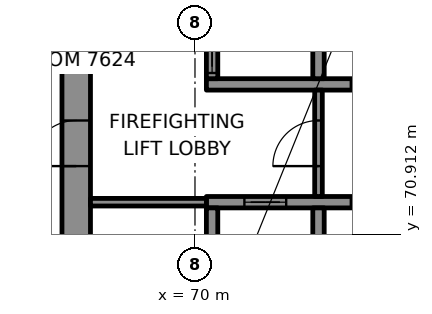
"""IFC4 building model, lengths in metres.
Left out: names, types, materials, properties, quantities, classifications, styles, units other than length and angle.
Written with IfcOpenShell. Run it as: python <this file> out.ifc"""

import sys

from ifc_helpers import new_model, si_unit, direction, frame, frame_2d, origin, place, context, subcontext, project, spatial, rectangle, extrude, element, fill, save


model = new_model("IFC4")
c1 = context("Model", 3, precision=1e-05, world=origin(), true_north=direction((0.0, 1.0)))
c2 = subcontext(c1, "Body", "Model", "MODEL_VIEW")
j1 = project(units=[si_unit("LENGTHUNIT", "METRE"), si_unit("PLANEANGLEUNIT", "RADIAN")], contexts=[c1])
p1 = place(None, origin())
s1 = spatial("IfcSite", under=j1, at=p1, CompositionType="ELEMENT")
p2 = place(p1, origin())
s2 = spatial("IfcBuilding", under=s1, at=p2, CompositionType="ELEMENT")
p3 = place(p2, frame((0.0, 0.0, 312.6)))
s3 = spatial("IfcBuildingStorey", under=s2, at=p3, CompositionType="ELEMENT", Elevation=312.6)
p4 = place(p3, frame((66.875, 69.0, 0.0), z_axis=(0.0, 0.0, 1.0), x_axis=(0.0, 1.0, 0.0)))
e1 = element("IfcWall", 1, at=p4, inside=s3, PredefinedType="SHEAR", context=c2, shape_type="SweptSolid", body=[
    extrude(rectangle(XDim=12.0, YDim=0.75, at=frame_2d((6.0, 0.0))), origin(), (0.0, 0.0, 1.0), 3.3),
])
p5 = place(p4, frame((3.7, 0.0, 0.0)))
e2 = element("IfcOpeningElement", 2, at=p5, cuts=e1, PredefinedType="OPENING", context=c2, shape_type="SweptSolid", body=[
    extrude(rectangle(XDim=1.2, YDim=2.1, at=frame_2d((0.6, 1.05))), frame((0.0, 0.385, 0.0), z_axis=(0.0, -1.0, 0.0), x_axis=(1.0, 0.0, 0.0)), (0.0, 0.0, 1.0), 0.77),
])
p6 = place(p3, frame((70.3, 71.75, 0.0), z_axis=(0.0, 0.0, 1.0), x_axis=(1.0, 0.0, 0.0)))
e3 = element("IfcWall", 3, at=p6, inside=s3, PredefinedType="SHEAR", context=c2, shape_type="SweptSolid", body=[
    extrude(rectangle(XDim=11.5, YDim=0.3, at=frame_2d((5.75, 0.0))), origin(), (0.0, 0.0, 1.0), 3.3),
])
p7 = place(p6, frame((1.0, 0.0, 0.0)))
e4 = element("IfcOpeningElement", 4, at=p7, cuts=e3, PredefinedType="OPENING", context=c2, shape_type="SweptSolid", body=[
    extrude(rectangle(XDim=1.1, YDim=2.1, at=frame_2d((0.55, 1.05))), frame((0.0, 0.16, 0.0), z_axis=(0.0, -1.0, 0.0), x_axis=(1.0, 0.0, 0.0)), (0.0, 0.0, 1.0), 0.32),
])
p8 = place(p6, frame((3.8, 0.0, 0.0)))
e5 = element("IfcOpeningElement", 5, at=p8, cuts=e3, PredefinedType="OPENING", context=c2, shape_type="SweptSolid", body=[
    extrude(rectangle(XDim=1.1, YDim=2.1, at=frame_2d((0.55, 1.05))), frame((0.0, 0.16, 0.0), z_axis=(0.0, -1.0, 0.0), x_axis=(1.0, 0.0, 0.0)), (0.0, 0.0, 1.0), 0.32),
])
p9 = place(p6, frame((6.6, 0.0, 0.0)))
e6 = element("IfcOpeningElement", 6, at=p9, cuts=e3, PredefinedType="OPENING", context=c2, shape_type="SweptSolid", body=[
    extrude(rectangle(XDim=1.1, YDim=2.1, at=frame_2d((0.55, 1.05))), frame((0.0, 0.16, 0.0), z_axis=(0.0, -1.0, 0.0), x_axis=(1.0, 0.0, 0.0)), (0.0, 0.0, 1.0), 0.32),
])
p10 = place(p6, frame((9.4, 0.0, 0.0)))
e7 = element("IfcOpeningElement", 7, at=p10, cuts=e3, PredefinedType="OPENING", context=c2, shape_type="SweptSolid", body=[
    extrude(rectangle(XDim=1.1, YDim=2.1, at=frame_2d((0.55, 1.05))), frame((0.0, 0.16, 0.0), z_axis=(0.0, -1.0, 0.0), x_axis=(1.0, 0.0, 0.0)), (0.0, 0.0, 1.0), 0.32),
])
p11 = place(p3, frame((70.3, 74.85, 0.0), z_axis=(0.0, 0.0, 1.0), x_axis=(1.0, 0.0, 0.0)))
e8 = element("IfcWall", 8, at=p11, inside=s3, PredefinedType="SHEAR", context=c2, shape_type="SweptSolid", body=[
    extrude(rectangle(XDim=5.9, YDim=0.3, at=frame_2d((2.95, 0.0))), origin(), (0.0, 0.0, 1.0), 3.3),
])
p12 = place(p11, frame((3.8, 0.0, 0.0)))
e9 = element("IfcOpeningElement", 9, at=p12, cuts=e8, PredefinedType="OPENING", context=c2, shape_type="SweptSolid", body=[
    extrude(rectangle(XDim=1.1, YDim=2.1, at=frame_2d((0.55, 1.05))), frame((0.0, 0.16, 0.0), z_axis=(0.0, -1.0, 0.0), x_axis=(1.0, 0.0, 0.0)), (0.0, 0.0, 1.0), 0.32),
])
p13 = place(p3, frame((70.45, 69.0, 0.0), z_axis=(0.0, 0.0, 1.0), x_axis=(0.0, 1.0, 0.0)))
e10 = element("IfcWall", 10, at=p13, inside=s3, PredefinedType="SHEAR", context=c2, shape_type="SweptSolid", body=[
    extrude(rectangle(XDim=2.6, YDim=0.3, at=frame_2d((1.3, 0.0))), origin(), (0.0, 0.0, 1.0), 3.3),
])
p14 = place(p3, frame((70.45, 75.0, 0.0), z_axis=(0.0, 0.0, 1.0), x_axis=(0.0, 1.0, 0.0)))
e11 = element("IfcWall", 11, at=p14, inside=s3, PredefinedType="SHEAR", context=c2, shape_type="SweptSolid", body=[
    extrude(rectangle(XDim=2.6, YDim=0.3, at=frame_2d((1.3, 0.0))), origin(), (0.0, 0.0, 1.0), 3.3),
])
p15 = place(p14, frame((0.15, 0.0, 0.0)))
e12 = element("IfcOpeningElement", 12, at=p15, cuts=e11, PredefinedType="OPENING", context=c2, shape_type="SweptSolid", body=[
    extrude(rectangle(XDim=1.1, YDim=2.1, at=frame_2d((0.55, 1.05))), frame((0.0, 0.16, 0.0), z_axis=(0.0, -1.0, 0.0), x_axis=(1.0, 0.0, 0.0)), (0.0, 0.0, 1.0), 0.32),
])
for number, where, z_axis, x_axis in (
    (13, (73.25, 69.0, 0.0), (0.0, 0.0, 1.0), (0.0, 1.0, 0.0)),
    (14, (73.25, 75.0, 0.0), (0.0, 0.0, 1.0), (0.0, 1.0, 0.0)),
):
    element("IfcWall", number, at=place(p3, frame(where, z_axis=z_axis, x_axis=x_axis)), inside=s3, PredefinedType="SHEAR", context=c2, shape_type="SweptSolid", body=[
        extrude(rectangle(XDim=2.6, YDim=0.3, at=frame_2d((1.3, 0.0))), origin(), (0.0, 0.0, 1.0), 3.3),
    ])
p16 = place(p3, frame((67.25, 71.75, 0.0), z_axis=(0.0, 0.0, 1.0), x_axis=(1.0, 0.0, 0.0)))
e15 = element("IfcWall", 15, at=p16, inside=s3, PredefinedType="PARTITIONING", context=c2, shape_type="SweptSolid", body=[
    extrude(rectangle(XDim=3.05, YDim=0.2, at=frame_2d((1.525, 0.0))), origin(), (0.0, 0.0, 1.0), 3.3),
])
p17 = place(p3, frame((73.25, 71.9, 0.0), z_axis=(0.0, 0.0, 1.0), x_axis=(0.0, 1.0, 0.0)))
e16 = element("IfcWall", 16, at=p17, inside=s3, PredefinedType="PARTITIONING", context=c2, shape_type="SweptSolid", body=[
    extrude(rectangle(XDim=2.8, YDim=0.2, at=frame_2d((1.4, 0.0))), origin(), (0.0, 0.0, 1.0), 3.3),
])
p18 = place(p17, frame((0.8, 0.0, 0.0)))
e17 = element("IfcOpeningElement", 17, at=p18, cuts=e16, PredefinedType="OPENING", context=c2, shape_type="SweptSolid", body=[
    extrude(rectangle(XDim=1.2, YDim=2.1, at=frame_2d((0.6, 1.05))), frame((0.0, 0.11, 0.0), z_axis=(0.0, -1.0, 0.0), x_axis=(1.0, 0.0, 0.0)), (0.0, 0.0, 1.0), 0.22),
])
p19 = place(p7, origin())
e18 = element("IfcDoor", 18, at=p19, inside=s3, OperationType="DOUBLE_DOOR_SLIDING", PredefinedType="DOOR", context=c2, shape_type="SweptSolid", body=[
    extrude(rectangle(XDim=1.1, YDim=2.1, at=frame_2d((0.55, 1.05))), frame((0.0, 0.025, 0.0), z_axis=(0.0, -1.0, 0.0), x_axis=(1.0, 0.0, 0.0)), (0.0, 0.0, 1.0), 0.05),
])
fill(e4, e18)
p20 = place(p8, origin())
e19 = element("IfcDoor", 19, at=p20, inside=s3, OperationType="DOUBLE_DOOR_SLIDING", PredefinedType="DOOR", context=c2, shape_type="SweptSolid", body=[
    extrude(rectangle(XDim=1.1, YDim=2.1, at=frame_2d((0.55, 1.05))), frame((0.0, 0.025, 0.0), z_axis=(0.0, -1.0, 0.0), x_axis=(1.0, 0.0, 0.0)), (0.0, 0.0, 1.0), 0.05),
])
fill(e5, e19)
p21 = place(p15, origin())
e20 = element("IfcDoor", 20, at=p21, inside=s3, OperationType="DOUBLE_DOOR_SLIDING", PredefinedType="DOOR", context=c2, shape_type="SweptSolid", body=[
    extrude(rectangle(XDim=1.1, YDim=2.1, at=frame_2d((0.55, 1.05))), frame((0.0, 0.025, 0.0), z_axis=(0.0, -1.0, 0.0), x_axis=(1.0, 0.0, 0.0)), (0.0, 0.0, 1.0), 0.05),
])
fill(e12, e20)
p22 = place(p12, origin())
e21 = element("IfcDoor", 21, at=p22, inside=s3, OperationType="DOUBLE_DOOR_SLIDING", PredefinedType="DOOR", context=c2, shape_type="SweptSolid", body=[
    extrude(rectangle(XDim=1.1, YDim=2.1, at=frame_2d((0.55, 1.05))), frame((0.0, 0.025, 0.0), z_axis=(0.0, -1.0, 0.0), x_axis=(1.0, 0.0, 0.0)), (0.0, 0.0, 1.0), 0.05),
])
fill(e9, e21)
p23 = place(p18, origin())
e22 = element("IfcDoor", 22, at=p23, inside=s3, OperationType="SINGLE_SWING_LEFT", PredefinedType="DOOR", context=c2, shape_type="SweptSolid", body=[
    extrude(rectangle(XDim=1.2, YDim=2.1, at=frame_2d((0.6, 1.05))), frame((0.0, 0.025, 0.0), z_axis=(0.0, -1.0, 0.0), x_axis=(1.0, 0.0, 0.0)), (0.0, 0.0, 1.0), 0.05),
])
fill(e17, e22)
p24 = place(p5, origin())
e23 = element("IfcDoor", 23, at=p24, inside=s3, OperationType="SINGLE_SWING_RIGHT", PredefinedType="DOOR", context=c2, shape_type="SweptSolid", body=[
    extrude(rectangle(XDim=1.2, YDim=2.1, at=frame_2d((0.6, 1.05))), frame((0.0, 0.095, 0.0), z_axis=(0.0, -1.0, 0.0), x_axis=(1.0, 0.0, 0.0)), (0.0, 0.0, 1.0), 0.19),
])
fill(e2, e23)
save(model, sys.argv[1])
